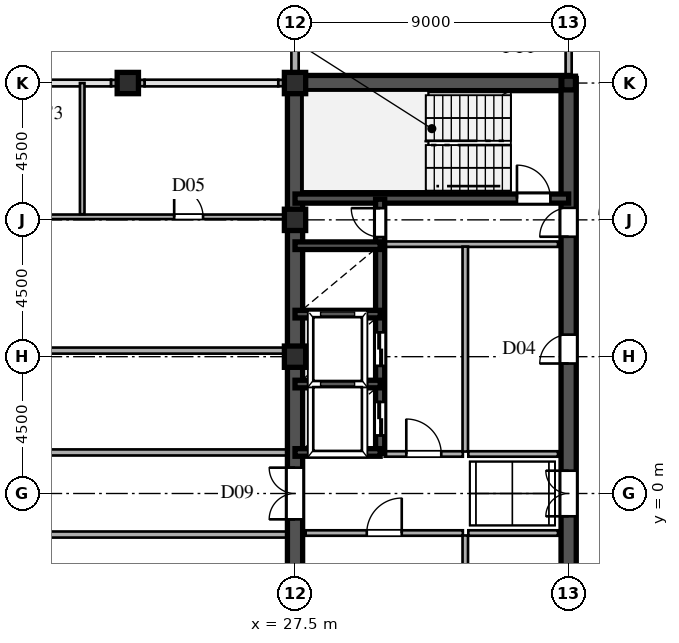
"""IFC4 building model, lengths in metres.
Left out: names, types, materials, properties, quantities, classifications, styles, units other than length and angle.
Written with IfcOpenShell. Run it as: python <this file> out.ifc"""

import sys

from ifc_helpers import new_model, si_unit, direction, frame, frame_2d, origin, origin_2d, place, context, subcontext, project, spatial, rectangle, hollow_rectangle, i_section, extrude, source, transform, mapped, element, fill, save


model = new_model("IFC4")
c1 = context("Model", 3, precision=1e-05, world=origin(), true_north=direction((0.0, 1.0)))
c2 = subcontext(c1, "Body", "Model", "MODEL_VIEW")
j1 = project(units=[si_unit("LENGTHUNIT", "METRE"), si_unit("PLANEANGLEUNIT", "RADIAN")], contexts=[c1])
p1 = place(None, origin())
s1 = spatial("IfcSite", under=j1, at=p1, CompositionType="ELEMENT")
p2 = place(p1, origin())
s2 = spatial("IfcBuilding", under=s1, at=p2, CompositionType="ELEMENT")
p3 = place(p2, frame((0.0, 0.0, 265.65)))
s3 = spatial("IfcBuildingStorey", under=s2, at=p3, CompositionType="ELEMENT", Elevation=265.65)
m1 = source(origin(), c2, "Body", "SweptSolid", [
    extrude(hollow_rectangle(XDim=0.7, YDim=0.7, WallThickness=0.03, at=origin_2d()), origin(), (0.0, 0.0, 1.0), 3.75),
])
for number, where, z_axis, x_axis in (
    (1, (27.5, 4.5, 0.0), (0.0, 0.0, 1.0), (1.0, 0.0, 0.0)),
    (2, (27.5, 9.0, 0.0), (0.0, 0.0, 1.0), (1.0, 0.0, 0.0)),
    (3, (27.5, 13.5, 0.0), (0.0, 0.0, 1.0), (1.0, 0.0, 0.0)),
):
    element("IfcColumn", number, at=place(p3, frame(where, z_axis=z_axis, x_axis=x_axis)), inside=s3, PredefinedType="COLUMN", context=c2, shape_type="MappedRepresentation", body=[
        mapped(m1, transform((0.0, 0.0, 0.0), scale=1.0)),
    ])
m2 = source(origin(), c2, "Body", "SweptSolid", [
    extrude(i_section(OverallWidth=0.45, OverallDepth=0.45, WebThickness=0.016, FlangeThickness=0.025, at=origin_2d()), origin(), (0.0, 0.0, 1.0), 3.75),
])
p4 = place(p3, frame((36.5, 13.5, 0.0), z_axis=(0.0, 0.0, 1.0), x_axis=(1.0, 0.0, 0.0)))
e4 = element("IfcColumn", 4, at=p4, inside=s3, PredefinedType="COLUMN", context=c2, shape_type="MappedRepresentation", body=[
    mapped(m2, transform((0.0, 0.0, 0.0), scale=1.0)),
])
p5 = place(p3, frame((22.0, 13.5, 0.0), z_axis=(0.0, 0.0, 1.0), x_axis=(1.0, 0.0, 0.0)))
e5 = element("IfcColumn", 5, at=p5, inside=s3, PredefinedType="COLUMN", context=c2, shape_type="MappedRepresentation", body=[
    mapped(m1, transform((0.0, 0.0, 0.0), scale=1.0)),
])
p6 = place(p3, frame((27.5, 13.755, 0.0), z_axis=(0.0, 0.0, 1.0), x_axis=(0.0, 1.0, 0.0)))
e6 = element("IfcWall", 6, at=p6, inside=s3, PredefinedType="SOLIDWALL", context=c2, shape_type="SweptSolid", body=[
    extrude(rectangle(XDim=0.62, YDim=0.24, at=frame_2d((0.31, 0.0))), origin(), (0.0, 0.0, 1.0), 2.99),
])
p7 = place(p3, frame((27.5, 14.375, 0.0), z_axis=(0.0, 0.0, 1.0), x_axis=(0.0, 1.0, 0.0)))
e7 = element("IfcWall", 7, at=p7, inside=s3, PredefinedType="SOLIDWALL", context=c2, shape_type="SweptSolid", body=[
    extrude(rectangle(XDim=1.605, YDim=0.24, at=frame_2d((0.803, 0.0))), origin(), (0.0, 0.0, 1.0), 3.49),
])
p8 = place(p3, frame((21.45, 13.5, 0.0), z_axis=(0.0, 0.0, 1.0), x_axis=(1.0, 0.0, 0.0)))
e8 = element("IfcWall", 8, at=p8, inside=s3, PredefinedType="SOLIDWALL", context=c2, shape_type="SweptSolid", body=[
    extrude(rectangle(XDim=1.1, YDim=0.21, at=frame_2d((0.55, 0.0))), origin(), (0.0, 0.0, 1.0), 2.99),
])
p9 = place(p3, frame((26.95, 13.5, 0.0), z_axis=(0.0, 0.0, 1.0), x_axis=(1.0, 0.0, 0.0)))
e9 = element("IfcWall", 9, at=p9, inside=s3, PredefinedType="SOLIDWALL", context=c2, shape_type="SweptSolid", body=[
    extrude(rectangle(XDim=0.54, YDim=0.21, at=frame_2d((0.27, 0.0))), origin(), (0.0, 0.0, 1.0), 2.99),
])
for number, where, z_axis, x_axis in (
    (10, (27.5, -13.5, 0.0), (0.0, 0.0, 1.0), (0.0, 1.0, 0.0)),
    (11, (27.5, 1.3, 0.0), (0.0, 0.0, 1.0), (0.0, 1.0, 0.0)),
):
    element("IfcWall", number, at=place(p3, frame(where, z_axis=z_axis, x_axis=x_axis)), inside=s3, PredefinedType="SHEAR", context=c2, shape_type="SweptSolid", body=[
        extrude(rectangle(XDim=12.2, YDim=0.5, at=frame_2d((6.1, 0.0))), origin(), (0.0, 0.0, 1.0), 3.49),
    ])
p10 = place(p3, frame((27.5, -1.3, 0.0), z_axis=(0.0, 0.0, 1.0), x_axis=(0.0, 1.0, 0.0)))
e12 = element("IfcWall", 12, at=p10, inside=s3, PredefinedType="SHEAR", context=c2, shape_type="SweptSolid", body=[
    extrude(rectangle(XDim=2.6, YDim=0.5, at=frame_2d((1.3, 0.0))), origin(), (0.0, 0.0, 1.0), 3.49),
])
p11 = place(p10, frame((0.45, 0.0, 0.0)))
e13 = element("IfcOpeningElement", 13, at=p11, cuts=e12, PredefinedType="OPENING", context=c2, shape_type="SweptSolid", body=[
    extrude(rectangle(XDim=1.7, YDim=2.35, at=frame_2d((0.85, 1.175))), frame((0.0, 0.26, 0.0), z_axis=(0.0, -1.0, 0.0), x_axis=(1.0, 0.0, 0.0)), (0.0, 0.0, 1.0), 0.52),
])
p12 = place(p3, frame((27.5, 13.5, 0.0), z_axis=(0.0, 0.0, 1.0), x_axis=(1.0, 0.0, 0.0)))
e14 = element("IfcWall", 14, at=p12, inside=s3, PredefinedType="SHEAR", context=c2, shape_type="SweptSolid", body=[
    extrude(rectangle(XDim=9.0, YDim=0.5, at=frame_2d((4.5, 0.0))), origin(), (0.0, 0.0, 1.0), 3.49),
])
p13 = place(p3, frame((36.5, -1.3, 0.0), z_axis=(0.0, 0.0, 1.0), x_axis=(0.0, 1.0, 0.0)))
e15 = element("IfcWall", 15, at=p13, inside=s3, PredefinedType="SHEAR", context=c2, shape_type="SweptSolid", body=[
    extrude(rectangle(XDim=2.6, YDim=0.5, at=frame_2d((1.3, 0.0))), origin(), (0.0, 0.0, 1.0), 3.49),
])
p14 = place(p13, frame((0.55, 0.0, 0.0)))
e16 = element("IfcOpeningElement", 16, at=p14, cuts=e15, PredefinedType="OPENING", context=c2, shape_type="SweptSolid", body=[
    extrude(rectangle(XDim=1.5, YDim=2.3, at=frame_2d((0.75, 1.15))), frame((0.0, 0.26, 0.0), z_axis=(0.0, -1.0, 0.0), x_axis=(1.0, 0.0, 0.0)), (0.0, 0.0, 1.0), 0.52),
])
p15 = place(p3, frame((36.5, 8.2, 0.0), z_axis=(0.0, 0.0, 1.0), x_axis=(0.0, 1.0, 0.0)))
e17 = element("IfcWall", 17, at=p15, inside=s3, PredefinedType="SHEAR", context=c2, shape_type="SweptSolid", body=[
    extrude(rectangle(XDim=5.45, YDim=0.5, at=frame_2d((2.725, 0.0))), origin(), (0.0, 0.0, 1.0), 3.49),
])
p16 = place(p15, frame((0.245, 0.0, 0.0)))
e18 = element("IfcOpeningElement", 18, at=p16, cuts=e17, PredefinedType="OPENING", context=c2, shape_type="SweptSolid", body=[
    extrude(rectangle(XDim=0.95, YDim=2.15, at=frame_2d((0.475, 1.075))), frame((0.0, 0.26, 0.0), z_axis=(0.0, -1.0, 0.0), x_axis=(1.0, 0.0, 0.0)), (0.0, 0.0, 1.0), 0.52),
])
p17 = place(p3, frame((36.5, -6.5, 0.0), z_axis=(0.0, 0.0, 1.0), x_axis=(0.0, 1.0, 0.0)))
e19 = element("IfcWall", 19, at=p17, inside=s3, PredefinedType="SHEAR", context=c2, shape_type="SweptSolid", body=[
    extrude(rectangle(XDim=5.2, YDim=0.5, at=frame_2d((2.6, 0.0))), origin(), (0.0, 0.0, 1.0), 3.49),
])
p18 = place(p17, frame((2.125, 0.0, 0.0)))
e20 = element("IfcOpeningElement", 20, at=p18, cuts=e19, PredefinedType="OPENING", context=c2, shape_type="SweptSolid", body=[
    extrude(rectangle(XDim=0.95, YDim=2.15, at=frame_2d((0.475, 1.075))), frame((0.0, 0.26, 0.0), z_axis=(0.0, -1.0, 0.0), x_axis=(1.0, 0.0, 0.0)), (0.0, 0.0, 1.0), 0.52),
])
p19 = place(p3, frame((36.5, 1.3, 0.0), z_axis=(0.0, 0.0, 1.0), x_axis=(0.0, 1.0, 0.0)))
e21 = element("IfcWall", 21, at=p19, inside=s3, PredefinedType="SHEAR", context=c2, shape_type="SweptSolid", body=[
    extrude(rectangle(XDim=6.9, YDim=0.5, at=frame_2d((3.45, 0.0))), origin(), (0.0, 0.0, 1.0), 3.49),
])
p20 = place(p19, frame((2.975, 0.0, 0.0)))
e22 = element("IfcOpeningElement", 22, at=p20, cuts=e21, PredefinedType="OPENING", context=c2, shape_type="SweptSolid", body=[
    extrude(rectangle(XDim=0.95, YDim=2.15, at=frame_2d((0.475, 1.075))), frame((0.0, 0.26, 0.0), z_axis=(0.0, -1.0, 0.0), x_axis=(1.0, 0.0, 0.0)), (0.0, 0.0, 1.0), 0.52),
])
p21 = place(p3, frame((27.5, 9.7, 0.0), z_axis=(0.0, 0.0, 1.0), x_axis=(1.0, 0.0, 0.0)))
e23 = element("IfcWall", 23, at=p21, inside=s3, PredefinedType="SHEAR", context=c2, shape_type="SweptSolid", body=[
    extrude(rectangle(XDim=9.0, YDim=0.3, at=frame_2d((4.5, 0.0))), origin(), (0.0, 0.0, 1.0), 3.49),
])
p22 = place(p21, frame((7.3, 0.0, 0.0)))
e24 = element("IfcOpeningElement", 24, at=p22, cuts=e23, PredefinedType="OPENING", context=c2, shape_type="SweptSolid", body=[
    extrude(rectangle(XDim=1.1, YDim=2.2, at=frame_2d((0.55, 1.1))), frame((0.0, 0.16, 0.0), z_axis=(0.0, -1.0, 0.0), x_axis=(1.0, 0.0, 0.0)), (0.0, 0.0, 1.0), 0.32),
])
for number, where, z_axis, x_axis in (
    (25, (27.5, 1.35, 0.0), (0.0, 0.0, 1.0), (1.0, 0.0, 0.0)),
    (26, (27.5, 3.6, 0.0), (0.0, 0.0, 1.0), (1.0, 0.0, 0.0)),
    (27, (27.5, 5.9, 0.0), (0.0, 0.0, 1.0), (1.0, 0.0, 0.0)),
    (28, (27.5, 8.15, 0.0), (0.0, 0.0, 1.0), (1.0, 0.0, 0.0)),
):
    element("IfcWall", number, at=place(p3, frame(where, z_axis=z_axis, x_axis=x_axis)), inside=s3, PredefinedType="SHEAR", context=c2, shape_type="SweptSolid", body=[
        extrude(rectangle(XDim=2.8, YDim=0.25, at=frame_2d((1.4, 0.0))), origin(), (0.0, 0.0, 1.0), 3.49),
    ])
p23 = place(p3, frame((30.3, 1.32, 0.0), z_axis=(0.0, 0.0, 1.0), x_axis=(0.0, 1.0, 0.0)))
e29 = element("IfcWall", 29, at=p23, inside=s3, PredefinedType="SHEAR", context=c2, shape_type="SweptSolid", body=[
    extrude(rectangle(XDim=2.28, YDim=0.3, at=frame_2d((1.14, 0.0))), origin(), (0.0, 0.0, 1.0), 3.49),
])
p24 = place(p23, frame((0.59, 0.0, 0.0)))
e30 = element("IfcOpeningElement", 30, at=p24, cuts=e29, PredefinedType="OPENING", context=c2, shape_type="SweptSolid", body=[
    extrude(rectangle(XDim=1.1, YDim=2.2, at=frame_2d((0.55, 1.1))), frame((0.0, 0.16, 0.0), z_axis=(0.0, -1.0, 0.0), x_axis=(1.0, 0.0, 0.0)), (0.0, 0.0, 1.0), 0.32),
])
p25 = place(p3, frame((30.3, 3.6, 0.0), z_axis=(0.0, 0.0, 1.0), x_axis=(0.0, 1.0, 0.0)))
e31 = element("IfcWall", 31, at=p25, inside=s3, PredefinedType="SHEAR", context=c2, shape_type="SweptSolid", body=[
    extrude(rectangle(XDim=2.3, YDim=0.3, at=frame_2d((1.15, 0.0))), origin(), (0.0, 0.0, 1.0), 3.49),
])
p26 = place(p25, frame((0.6, 0.0, 0.0)))
e32 = element("IfcOpeningElement", 32, at=p26, cuts=e31, PredefinedType="OPENING", context=c2, shape_type="SweptSolid", body=[
    extrude(rectangle(XDim=1.1, YDim=2.2, at=frame_2d((0.55, 1.1))), frame((0.0, 0.16, 0.0), z_axis=(0.0, -1.0, 0.0), x_axis=(1.0, 0.0, 0.0)), (0.0, 0.0, 1.0), 0.32),
])
p27 = place(p3, frame((30.3, 5.9, 0.0), z_axis=(0.0, 0.0, 1.0), x_axis=(0.0, 1.0, 0.0)))
e33 = element("IfcWall", 33, at=p27, inside=s3, PredefinedType="SHEAR", context=c2, shape_type="SweptSolid", body=[
    extrude(rectangle(XDim=2.25, YDim=0.3, at=frame_2d((1.125, 0.0))), origin(), (0.0, 0.0, 1.0), 3.49),
])
p28 = place(p3, frame((30.3, 8.15, 0.0), z_axis=(0.0, 0.0, 1.0), x_axis=(0.0, 1.0, 0.0)))
e34 = element("IfcWall", 34, at=p28, inside=s3, PredefinedType="SHEAR", context=c2, shape_type="SweptSolid", body=[
    extrude(rectangle(XDim=1.53, YDim=0.3, at=frame_2d((0.765, 0.0))), origin(), (0.0, 0.0, 1.0), 3.49),
])
p29 = place(p28, frame((0.285, 0.0, 0.0)))
e35 = element("IfcOpeningElement", 35, at=p29, cuts=e34, PredefinedType="OPENING", context=c2, shape_type="SweptSolid", body=[
    extrude(rectangle(XDim=0.95, YDim=2.15, at=frame_2d((0.475, 1.075))), frame((0.0, 0.16, 0.0), z_axis=(0.0, -1.0, 0.0), x_axis=(1.0, 0.0, 0.0)), (0.0, 0.0, 1.0), 0.32),
])
p30 = place(p3, frame((30.45, 8.2, 0.0), z_axis=(0.0, 0.0, 1.0), x_axis=(1.0, 0.0, 0.0)))
e36 = element("IfcWall", 36, at=p30, inside=s3, PredefinedType="PARTITIONING", context=c2, shape_type="SweptSolid", body=[
    extrude(rectangle(XDim=5.7, YDim=0.18, at=frame_2d((2.85, 0.0))), origin(), (0.0, 0.0, 1.0), 3.49),
])
p31 = place(p3, frame((33.1, -6.42, 0.0), z_axis=(0.0, 0.0, 1.0), x_axis=(0.0, 1.0, 0.0)))
e37 = element("IfcWall", 37, at=p31, inside=s3, PredefinedType="PARTITIONING", context=c2, shape_type="SweptSolid", body=[
    extrude(rectangle(XDim=5.04, YDim=0.18, at=frame_2d((2.52, 0.0))), origin(), (0.0, 0.0, 1.0), 3.49),
])
p32 = place(p3, frame((33.1, 1.38, 0.0), z_axis=(0.0, 0.0, 1.0), x_axis=(0.0, 1.0, 0.0)))
e38 = element("IfcWall", 38, at=p32, inside=s3, PredefinedType="PARTITIONING", context=c2, shape_type="SweptSolid", body=[
    extrude(rectangle(XDim=6.74, YDim=0.18, at=frame_2d((3.37, 0.0))), origin(), (0.0, 0.0, 1.0), 3.49),
])
p33 = place(p3, frame((27.85, -1.3, 0.0), z_axis=(0.0, 0.0, 1.0), x_axis=(1.0, 0.0, 0.0)))
e39 = element("IfcWall", 39, at=p33, inside=s3, PredefinedType="PARTITIONING", context=c2, shape_type="SweptSolid", body=[
    extrude(rectangle(XDim=5.17, YDim=0.18, at=frame_2d((2.585, 0.0))), origin(), (0.0, 0.0, 1.0), 3.49),
])
p34 = place(p33, frame((2.01, 0.0, 0.0)))
e40 = element("IfcOpeningElement", 40, at=p34, cuts=e39, PredefinedType="OPENING", context=c2, shape_type="SweptSolid", body=[
    extrude(rectangle(XDim=1.15, YDim=2.2, at=frame_2d((0.575, 1.1))), frame((0.0, 0.1, 0.0), z_axis=(0.0, -1.0, 0.0), x_axis=(1.0, 0.0, 0.0)), (0.0, 0.0, 1.0), 0.2),
])
p35 = place(p3, frame((30.45, 1.3, 0.0), z_axis=(0.0, 0.0, 1.0), x_axis=(1.0, 0.0, 0.0)))
e41 = element("IfcWall", 41, at=p35, inside=s3, PredefinedType="PARTITIONING", context=c2, shape_type="SweptSolid", body=[
    extrude(rectangle(XDim=2.57, YDim=0.18, at=frame_2d((1.285, 0.0))), origin(), (0.0, 0.0, 1.0), 3.49),
])
p36 = place(p35, frame((0.71, 0.0, 0.0)))
e42 = element("IfcOpeningElement", 42, at=p36, cuts=e41, PredefinedType="OPENING", context=c2, shape_type="SweptSolid", body=[
    extrude(rectangle(XDim=1.15, YDim=2.2, at=frame_2d((0.575, 1.1))), frame((0.0, 0.1, 0.0), z_axis=(0.0, -1.0, 0.0), x_axis=(1.0, 0.0, 0.0)), (0.0, 0.0, 1.0), 0.2),
])
for number, where, z_axis, x_axis in (
    (43, (33.2, -1.3, 0.0), (0.0, 0.0, 1.0), (1.0, 0.0, 0.0)),
    (44, (33.2, 1.3, 0.0), (0.0, 0.0, 1.0), (1.0, 0.0, 0.0)),
):
    element("IfcWall", number, at=place(p3, frame(where, z_axis=z_axis, x_axis=x_axis)), inside=s3, PredefinedType="PARTITIONING", context=c2, shape_type="SweptSolid", body=[
        extrude(rectangle(XDim=2.95, YDim=0.18, at=frame_2d((1.475, 0.0))), origin(), (0.0, 0.0, 1.0), 3.49),
    ])
p37 = place(p3, frame((6.885, -1.35, 0.0), z_axis=(0.0, 0.0, 1.0), x_axis=(1.0, 0.0, 0.0)))
e45 = element("IfcWall", 45, at=p37, inside=s3, PredefinedType="PARTITIONING", context=c2, shape_type="SweptSolid", body=[
    extrude(rectangle(XDim=20.36, YDim=0.2, at=frame_2d((10.18, 0.0))), origin(), (0.0, 0.0, 1.0), 3.49),
])
p38 = place(p37, frame((6.34, 0.0, 0.0)))
e46 = element("IfcOpeningElement", 46, at=p38, cuts=e45, PredefinedType="OPENING", context=c2, shape_type="SweptSolid", body=[
    extrude(rectangle(XDim=1.05, YDim=2.25, at=frame_2d((0.525, 1.125))), frame((0.0, 0.11, 0.0), z_axis=(0.0, -1.0, 0.0), x_axis=(1.0, 0.0, 0.0)), (0.0, 0.0, 1.0), 0.22),
])
p39 = place(p3, frame((6.885, 1.35, 0.0), z_axis=(0.0, 0.0, 1.0), x_axis=(1.0, 0.0, 0.0)))
e47 = element("IfcWall", 47, at=p39, inside=s3, PredefinedType="PARTITIONING", context=c2, shape_type="SweptSolid", body=[
    extrude(rectangle(XDim=20.36, YDim=0.2, at=frame_2d((10.18, 0.0))), origin(), (0.0, 0.0, 1.0), 3.49),
])
p40 = place(p39, frame((6.34, 0.0, 0.0)))
e48 = element("IfcOpeningElement", 48, at=p40, cuts=e47, PredefinedType="OPENING", context=c2, shape_type="SweptSolid", body=[
    extrude(rectangle(XDim=1.05, YDim=2.25, at=frame_2d((0.525, 1.125))), frame((0.0, 0.11, 0.0), z_axis=(0.0, -1.0, 0.0), x_axis=(1.0, 0.0, 0.0)), (0.0, 0.0, 1.0), 0.22),
])
p41 = place(p3, frame((-27.245, 4.7, 0.0), z_axis=(0.0, 0.0, 1.0), x_axis=(1.0, 0.0, 0.0)))
e49 = element("IfcWall", 49, at=p41, inside=s3, PredefinedType="PARTITIONING", context=c2, shape_type="SweptSolid", body=[
    extrude(rectangle(XDim=54.49, YDim=0.2, at=frame_2d((27.245, 0.0))), origin(), (0.0, 0.0, 1.0), 3.49),
])
p42 = place(p41, frame((22.47, 0.0, 0.0)))
e50 = element("IfcOpeningElement", 50, at=p42, cuts=e49, PredefinedType="OPENING", context=c2, shape_type="SweptSolid", body=[
    extrude(rectangle(XDim=1.05, YDim=2.25, at=frame_2d((0.525, 1.125))), frame((0.0, 0.11, 0.0), z_axis=(0.0, -1.0, 0.0), x_axis=(1.0, 0.0, 0.0)), (0.0, 0.0, 1.0), 0.22),
])
p43 = place(p3, frame((4.585, 9.1, 0.0), z_axis=(0.0, 0.0, 1.0), x_axis=(1.0, 0.0, 0.0)))
e51 = element("IfcWall", 51, at=p43, inside=s3, PredefinedType="PARTITIONING", context=c2, shape_type="SweptSolid", body=[
    extrude(rectangle(XDim=22.66, YDim=0.15, at=frame_2d((11.33, 0.0))), origin(), (0.0, 0.0, 1.0), 3.49),
])
p44 = place(p43, frame((3.94, 0.0, 0.0)))
e52 = element("IfcOpeningElement", 52, at=p44, cuts=e51, PredefinedType="OPENING", context=c2, shape_type="SweptSolid", body=[
    extrude(rectangle(XDim=0.95, YDim=2.15, at=frame_2d((0.475, 1.075))), frame((0.0, 0.085, 0.0), z_axis=(0.0, -1.0, 0.0), x_axis=(1.0, 0.0, 0.0)), (0.0, 0.0, 1.0), 0.17),
])
p45 = place(p43, frame((11.94, 0.0, 0.0)))
e53 = element("IfcOpeningElement", 53, at=p45, cuts=e51, PredefinedType="OPENING", context=c2, shape_type="SweptSolid", body=[
    extrude(rectangle(XDim=0.95, YDim=2.15, at=frame_2d((0.475, 1.075))), frame((0.0, 0.085, 0.0), z_axis=(0.0, -1.0, 0.0), x_axis=(1.0, 0.0, 0.0)), (0.0, 0.0, 1.0), 0.17),
])
p46 = place(p43, frame((18.94, 0.0, 0.0)))
e54 = element("IfcOpeningElement", 54, at=p46, cuts=e51, PredefinedType="OPENING", context=c2, shape_type="SweptSolid", body=[
    extrude(rectangle(XDim=0.95, YDim=2.15, at=frame_2d((0.475, 1.075))), frame((0.0, 0.085, 0.0), z_axis=(0.0, -1.0, 0.0), x_axis=(1.0, 0.0, 0.0)), (0.0, 0.0, 1.0), 0.17),
])
p47 = place(p3, frame((20.5, 9.185, 0.0), z_axis=(0.0, 0.0, 1.0), x_axis=(0.0, 1.0, 0.0)))
e55 = element("IfcWall", 55, at=p47, inside=s3, PredefinedType="PARTITIONING", context=c2, shape_type="SweptSolid", body=[
    extrude(rectangle(XDim=4.315, YDim=0.15, at=frame_2d((2.157, 0.0))), origin(), (0.0, 0.0, 1.0), 3.49),
])
p48 = place(p3, frame((36.5, 13.755, 0.0), z_axis=(0.0, 0.0, 1.0), x_axis=(0.0, 1.0, 0.0)))
e56 = element("IfcWall", 56, at=p48, inside=s3, PredefinedType="PARTITIONING", context=c2, shape_type="SweptSolid", body=[
    extrude(rectangle(XDim=1.76, YDim=0.2, at=frame_2d((0.88, 0.0))), origin(), (0.0, 0.0, 1.0), 2.89),
])
m3 = source(origin(), c2, "Body", "SweptSolid", [
    extrude(rectangle(XDim=1.7, YDim=2.35, at=frame_2d((0.85, 1.175))), frame((0.0, 0.025, 0.0), z_axis=(0.0, -1.0, 0.0), x_axis=(1.0, 0.0, 0.0)), (0.0, 0.0, 1.0), 0.05),
])
p49 = place(p11, origin())
e57 = element("IfcDoor", 57, at=p49, inside=s3, OperationType="DOUBLE_SWING_LEFT", PredefinedType="DOOR", context=c2, shape_type="MappedRepresentation", body=[
    mapped(m3, transform((0.0, 0.0, 0.0), scale=1.0)),
])
fill(e13, e57)
m4 = source(origin(), c2, "Body", "SweptSolid", [
    extrude(rectangle(XDim=1.5, YDim=2.3, at=frame_2d((0.75, 1.15))), frame((0.0, 0.025, 0.0), z_axis=(0.0, -1.0, 0.0), x_axis=(1.0, 0.0, 0.0)), (0.0, 0.0, 1.0), 0.05),
])
p50 = place(p14, origin())
e58 = element("IfcDoor", 58, at=p50, inside=s3, OperationType="DOUBLE_SWING_LEFT", PredefinedType="DOOR", context=c2, shape_type="MappedRepresentation", body=[
    mapped(m4, transform((0.0, 0.0, 0.0), scale=1.0)),
])
fill(e16, e58)
m5 = source(origin(), c2, "Body", "SweptSolid", [
    extrude(rectangle(XDim=0.95, YDim=2.15, at=frame_2d((0.475, 1.075))), frame((0.0, 0.025, 0.0), z_axis=(0.0, -1.0, 0.0), x_axis=(1.0, 0.0, 0.0)), (0.0, 0.0, 1.0), 0.05),
])
p51 = place(p16, origin())
e59 = element("IfcDoor", 59, at=p51, inside=s3, OperationType="SINGLE_SWING_LEFT", PredefinedType="DOOR", context=c2, shape_type="MappedRepresentation", body=[
    mapped(m5, transform((0.0, 0.0, 0.0), scale=1.0)),
])
fill(e18, e59)
p52 = place(p20, origin())
e60 = element("IfcDoor", 60, at=p52, inside=s3, OperationType="SINGLE_SWING_LEFT", PredefinedType="DOOR", context=c2, shape_type="MappedRepresentation", body=[
    mapped(m5, transform((0.0, 0.0, 0.0), scale=1.0)),
])
fill(e22, e60)
m6 = source(origin(), c2, "Body", "SweptSolid", [
    extrude(rectangle(XDim=1.1, YDim=2.2, at=frame_2d((0.55, 1.1))), frame((0.0, 0.025, 0.0), z_axis=(0.0, -1.0, 0.0), x_axis=(1.0, 0.0, 0.0)), (0.0, 0.0, 1.0), 0.05),
])
p53 = place(p22, origin())
e61 = element("IfcDoor", 61, at=p53, inside=s3, OperationType="SINGLE_SWING_LEFT", PredefinedType="DOOR", context=c2, shape_type="MappedRepresentation", body=[
    mapped(m6, transform((0.0, 0.0, 0.0), scale=1.0)),
])
fill(e24, e61)
m7 = source(origin(), c2, "Body", "SweptSolid", [
    extrude(rectangle(XDim=1.1, YDim=2.2, at=frame_2d((0.55, 1.1))), frame((0.0, 0.025, 0.0), z_axis=(0.0, -1.0, 0.0), x_axis=(1.0, 0.0, 0.0)), (0.0, 0.0, 1.0), 0.05),
])
p54 = place(p24, origin())
e62 = element("IfcDoor", 62, at=p54, inside=s3, OperationType="DOUBLE_DOOR_SLIDING", PredefinedType="DOOR", context=c2, shape_type="MappedRepresentation", body=[
    mapped(m7, transform((0.0, 0.0, 0.0), scale=1.0)),
])
fill(e30, e62)
p55 = place(p26, origin())
e63 = element("IfcDoor", 63, at=p55, inside=s3, OperationType="DOUBLE_DOOR_SLIDING", PredefinedType="DOOR", context=c2, shape_type="MappedRepresentation", body=[
    mapped(m7, transform((0.0, 0.0, 0.0), scale=1.0)),
])
fill(e32, e63)
p56 = place(p29, origin())
e64 = element("IfcDoor", 64, at=p56, inside=s3, OperationType="SINGLE_SWING_RIGHT", PredefinedType="DOOR", context=c2, shape_type="MappedRepresentation", body=[
    mapped(m5, transform((0.0, 0.0, 0.0), scale=1.0)),
])
fill(e35, e64)
m8 = source(origin(), c2, "Body", "SweptSolid", [
    extrude(rectangle(XDim=1.15, YDim=2.2, at=frame_2d((0.575, 1.1))), frame((0.0, 0.025, 0.0), z_axis=(0.0, -1.0, 0.0), x_axis=(1.0, 0.0, 0.0)), (0.0, 0.0, 1.0), 0.05),
])
p57 = place(p34, origin())
e65 = element("IfcDoor", 65, at=p57, inside=s3, OperationType="SINGLE_SWING_RIGHT", PredefinedType="DOOR", context=c2, shape_type="MappedRepresentation", body=[
    mapped(m8, transform((0.0, 0.0, 0.0), scale=1.0)),
])
fill(e40, e65)
p58 = place(p36, origin())
e66 = element("IfcDoor", 66, at=p58, inside=s3, OperationType="SINGLE_SWING_LEFT", PredefinedType="DOOR", context=c2, shape_type="MappedRepresentation", body=[
    mapped(m8, transform((0.0, 0.0, 0.0), scale=1.0)),
])
fill(e42, e66)
m9 = source(origin(), c2, "Body", "SweptSolid", [
    extrude(rectangle(XDim=0.95, YDim=2.15, at=frame_2d((0.475, 1.075))), frame((0.0, 0.025, 0.0), z_axis=(0.0, -1.0, 0.0), x_axis=(1.0, 0.0, 0.0)), (0.0, 0.0, 1.0), 0.05),
])
p59 = place(p46, origin())
e67 = element("IfcDoor", 67, at=p59, inside=s3, OperationType="SINGLE_SWING_LEFT", PredefinedType="DOOR", context=c2, shape_type="MappedRepresentation", body=[
    mapped(m9, transform((0.0, 0.0, 0.0), scale=1.0)),
])
fill(e54, e67)
save(model, sys.argv[1])
